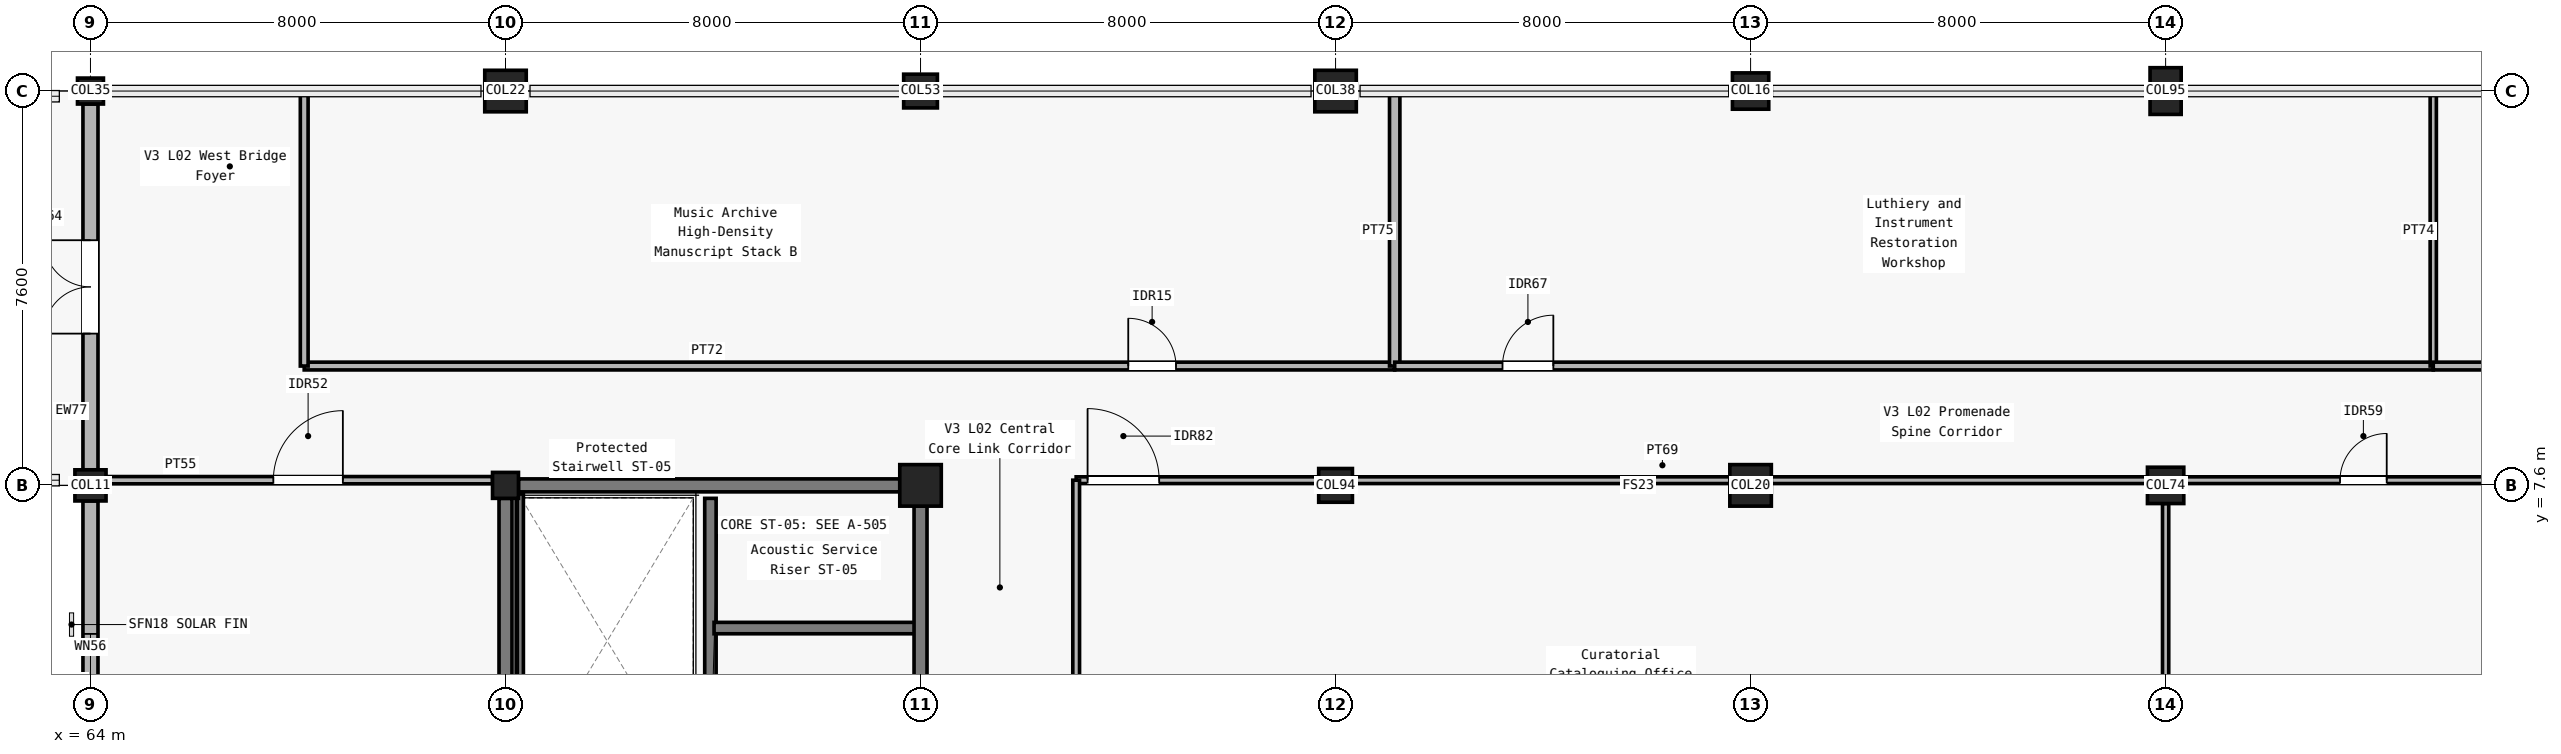
"""IFC4 building model, lengths in metres.
Left out: names, types, materials, properties, quantities, classifications, styles, units other than length and angle.
Written with IfcOpenShell. Run it as: python <this file> out.ifc"""

import sys

from ifc_helpers import new_model, si_unit, direction, frame, frame_2d, origin, origin_2d, place, context, subcontext, project, spatial, rectangle, circle, extrude, element, fill, save


model = new_model("IFC4")
c1 = context("Model", 3, precision=1e-05, world=origin(), true_north=direction((0.0, 1.0)))
c2 = subcontext(c1, "Body", "Model", "MODEL_VIEW")
j1 = project(units=[si_unit("LENGTHUNIT", "METRE"), si_unit("PLANEANGLEUNIT", "RADIAN")], contexts=[c1])
p1 = place(None, origin())
s1 = spatial("IfcSite", under=j1, at=p1, CompositionType="ELEMENT")
p2 = place(p1, origin())
s2 = spatial("IfcBuilding", under=s1, at=p2, CompositionType="ELEMENT")
p3 = place(p2, frame((0.0, 0.0, 10.2)))
s3 = spatial("IfcBuildingStorey", under=s2, at=p3, CompositionType="ELEMENT", Elevation=10.2)
p4 = place(p3, frame((64.0, 7.6, 0.0), z_axis=(0.0, 0.0, 1.0), x_axis=(1.0, 0.0, 0.0)))
e1 = element("IfcColumn", 1, at=p4, inside=s3, PredefinedType="COLUMN", context=c2, shape_type="SweptSolid", body=[
    extrude(rectangle(XDim=0.6, YDim=0.6, at=origin_2d()), origin(), (0.0, 0.0, 1.0), 4.8),
])
for number, where, z_axis, x_axis in (
    (2, (64.0, 15.2, 0.0), (0.0, 0.0, 1.0), (1.0, 0.0, 0.0)),
    (3, (72.0, 7.6, 0.0), (0.0, 0.0, 1.0), (1.0, 0.0, 0.0)),
):
    element("IfcColumn", number, at=place(p3, frame(where, z_axis=z_axis, x_axis=x_axis)), inside=s3, PredefinedType="COLUMN", context=c2, shape_type="SweptSolid", body=[
        extrude(rectangle(XDim=0.5, YDim=0.5, at=origin_2d()), origin(), (0.0, 0.0, 1.0), 4.8),
    ])
for number, where, z_axis, x_axis in (
    (4, (72.0, 15.2, 0.0), (0.0, 0.0, 1.0), (1.0, 0.0, 0.0)),
    (5, (80.0, 7.6, 0.0), (0.0, 0.0, 1.0), (1.0, 0.0, 0.0)),
):
    element("IfcColumn", number, at=place(p3, frame(where, z_axis=z_axis, x_axis=x_axis)), inside=s3, PredefinedType="COLUMN", context=c2, shape_type="SweptSolid", body=[
        extrude(circle(Radius=0.4, at=origin_2d()), origin(), (0.0, 0.0, 1.0), 4.8),
    ])
for number, where, z_axis, x_axis in (
    (6, (80.0, 15.2, 0.0), (0.0, 0.0, 1.0), (1.0, 0.0, 0.0)),
    (7, (88.0, 7.6, 0.0), (0.0, 0.0, 1.0), (1.0, 0.0, 0.0)),
):
    element("IfcColumn", number, at=place(p3, frame(where, z_axis=z_axis, x_axis=x_axis)), inside=s3, PredefinedType="COLUMN", context=c2, shape_type="SweptSolid", body=[
        extrude(circle(Radius=0.325, at=origin_2d()), origin(), (0.0, 0.0, 1.0), 4.8),
    ])
for number, where, z_axis, x_axis in (
    (8, (88.0, 15.2, 0.0), (0.0, 0.0, 1.0), (1.0, 0.0, 0.0)),
    (9, (96.0, 7.6, 0.0), (0.0, 0.0, 1.0), (1.0, 0.0, 0.0)),
):
    element("IfcColumn", number, at=place(p3, frame(where, z_axis=z_axis, x_axis=x_axis)), inside=s3, PredefinedType="COLUMN", context=c2, shape_type="SweptSolid", body=[
        extrude(rectangle(XDim=0.8, YDim=0.8, at=origin_2d()), origin(), (0.0, 0.0, 1.0), 4.8),
    ])
for number, where, z_axis, x_axis in (
    (10, (96.0, 15.2, 0.0), (0.0, 0.0, 1.0), (1.0, 0.0, 0.0)),
    (11, (104.0, 7.6, 0.0), (0.0, 0.0, 1.0), (1.0, 0.0, 0.0)),
):
    element("IfcColumn", number, at=place(p3, frame(where, z_axis=z_axis, x_axis=x_axis)), inside=s3, PredefinedType="COLUMN", context=c2, shape_type="SweptSolid", body=[
        extrude(rectangle(XDim=0.7, YDim=0.7, at=origin_2d()), origin(), (0.0, 0.0, 1.0), 4.8),
    ])
p5 = place(p3, frame((104.0, 15.2, 0.0), z_axis=(0.0, 0.0, 1.0), x_axis=(1.0, 0.0, 0.0)))
e12 = element("IfcColumn", 12, at=p5, inside=s3, PredefinedType="COLUMN", context=c2, shape_type="SweptSolid", body=[
    extrude(rectangle(XDim=0.6, YDim=0.9, at=origin_2d()), origin(), (0.0, 0.0, 1.0), 4.8),
])
p6 = place(p3, frame((64.0, 0.375, 0.0), z_axis=(0.0, 0.0, 1.0), x_axis=(0.0, 1.0, 0.0)))
e13 = element("IfcWall", 13, at=p6, inside=s3, PredefinedType="SOLIDWALL", context=c2, shape_type="SweptSolid", body=[
    extrude(rectangle(XDim=6.925, YDim=0.29, at=frame_2d((3.462, 0.0))), origin(), (0.0, 0.0, 1.0), 4.13),
])
p7 = place(p6, frame((2.562, 0.0, 0.95)))
e14 = element("IfcOpeningElement", 14, at=p7, cuts=e13, PredefinedType="OPENING", context=c2, shape_type="SweptSolid", body=[
    extrude(rectangle(XDim=1.8, YDim=1.5, at=frame_2d((0.9, 0.75))), frame((0.0, 0.155, 0.0), z_axis=(0.0, -1.0, 0.0), x_axis=(1.0, 0.0, 0.0)), (0.0, 0.0, 1.0), 0.31),
])
p8 = place(p3, frame((64.0, 7.9, 0.0), z_axis=(0.0, 0.0, 1.0), x_axis=(0.0, 1.0, 0.0)))
e15 = element("IfcWall", 15, at=p8, inside=s3, PredefinedType="SOLIDWALL", context=c2, shape_type="SweptSolid", body=[
    extrude(rectangle(XDim=7.05, YDim=0.29, at=frame_2d((3.525, 0.0))), origin(), (0.0, 0.0, 1.0), 4.13),
])
p9 = place(p8, frame((2.625, 0.0, 0.0)))
e16 = element("IfcOpeningElement", 16, at=p9, cuts=e15, PredefinedType="OPENING", context=c2, shape_type="SweptSolid", body=[
    extrude(rectangle(XDim=1.8, YDim=2.25, at=frame_2d((0.9, 1.125))), frame((0.0, 0.155, 0.0), z_axis=(0.0, -1.0, 0.0), x_axis=(1.0, 0.0, 0.0)), (0.0, 0.0, 1.0), 0.31),
])
p10 = place(p3, frame((72.0, 0.3, 0.0), z_axis=(0.0, 0.0, 1.0), x_axis=(0.0, 1.0, 0.0)))
e17 = element("IfcWall", 17, at=p10, inside=s3, PredefinedType="SOLIDWALL", context=c2, shape_type="SweptSolid", body=[
    extrude(rectangle(XDim=7.05, YDim=0.25, at=frame_2d((3.525, 0.0))), origin(), (0.0, 0.0, 1.0), 2.71),
])
p11 = place(p3, frame((72.25, 7.6, 0.0), z_axis=(0.0, 0.0, 1.0), x_axis=(1.0, 0.0, 0.0)))
e18 = element("IfcWall", 18, at=p11, inside=s3, PredefinedType="SOLIDWALL", context=c2, shape_type="SweptSolid", body=[
    extrude(rectangle(XDim=7.35, YDim=0.25, at=frame_2d((3.675, 0.0))), origin(), (0.0, 0.0, 1.0), 2.71),
])
p12 = place(p3, frame((75.95, 0.25, 0.0), z_axis=(0.0, 0.0, 1.0), x_axis=(0.0, 1.0, 0.0)))
e19 = element("IfcWall", 19, at=p12, inside=s3, PredefinedType="SOLIDWALL", context=c2, shape_type="SweptSolid", body=[
    extrude(rectangle(XDim=7.1, YDim=0.22, at=frame_2d((3.55, 0.0))), origin(), (0.0, 0.0, 1.0), 4.52),
])
p13 = place(p12, frame((0.35, 0.0, 0.0)))
e20 = element("IfcOpeningElement", 20, at=p13, cuts=e19, PredefinedType="OPENING", context=c2, shape_type="SweptSolid", body=[
    extrude(rectangle(XDim=1.2, YDim=2.15, at=frame_2d((0.6, 1.075))), frame((0.0, 0.12, 0.0), z_axis=(0.0, -1.0, 0.0), x_axis=(1.0, 0.0, 0.0)), (0.0, 0.0, 1.0), 0.24),
])
p14 = place(p3, frame((76.02, 4.85, 0.0), z_axis=(0.0, 0.0, 1.0), x_axis=(1.0, 0.0, 0.0)))
e21 = element("IfcWall", 21, at=p14, inside=s3, PredefinedType="SOLIDWALL", context=c2, shape_type="SweptSolid", body=[
    extrude(rectangle(XDim=3.93, YDim=0.22, at=frame_2d((1.965, 0.0))), origin(), (0.0, 0.0, 1.0), 3.89),
])
p15 = place(p3, frame((80.0, 0.25, 0.0), z_axis=(0.0, 0.0, 1.0), x_axis=(0.0, 1.0, 0.0)))
e22 = element("IfcWall", 22, at=p15, inside=s3, PredefinedType="SOLIDWALL", context=c2, shape_type="SweptSolid", body=[
    extrude(rectangle(XDim=6.95, YDim=0.25, at=frame_2d((3.475, 0.0))), origin(), (0.0, 0.0, 1.0), 3.89),
])
p16 = place(p15, frame((2.1, 0.0, 0.0)))
e23 = element("IfcOpeningElement", 23, at=p16, cuts=e22, PredefinedType="OPENING", context=c2, shape_type="SweptSolid", body=[
    extrude(rectangle(XDim=1.35, YDim=2.2, at=frame_2d((0.675, 1.1))), frame((0.0, 0.135, 0.0), z_axis=(0.0, -1.0, 0.0), x_axis=(1.0, 0.0, 0.0)), (0.0, 0.0, 1.0), 0.27),
])
p17 = place(p3, frame((68.12, 9.9, 0.0), z_axis=(0.0, 0.0, 1.0), x_axis=(1.0, 0.0, 0.0)))
e24 = element("IfcWall", 24, at=p17, inside=s3, PredefinedType="PARTITIONING", context=c2, shape_type="SweptSolid", body=[
    extrude(rectangle(XDim=21.02, YDim=0.15, at=frame_2d((10.51, 0.0))), origin(), (0.0, 0.0, 1.0), 3.89),
])
p18 = place(p17, frame((15.884, 0.0, 0.0)))
e25 = element("IfcOpeningElement", 25, at=p18, cuts=e24, PredefinedType="OPENING", context=c2, shape_type="SweptSolid", body=[
    extrude(rectangle(XDim=0.92, YDim=2.15, at=frame_2d((0.46, 1.075))), frame((0.0, 0.085, 0.0), z_axis=(0.0, -1.0, 0.0), x_axis=(1.0, 0.0, 0.0)), (0.0, 0.0, 1.0), 0.17),
])
p19 = place(p3, frame((89.14, 9.9, 0.0), z_axis=(0.0, 0.0, 1.0), x_axis=(0.0, 1.0, 0.0)))
e26 = element("IfcWall", 26, at=p19, inside=s3, PredefinedType="PARTITIONING", context=c2, shape_type="SweptSolid", body=[
    extrude(rectangle(XDim=5.22, YDim=0.2, at=frame_2d((2.61, 0.0))), origin(), (0.0, 0.0, 1.0), 3.955),
])
p20 = place(p3, frame((89.14, 9.9, 0.0), z_axis=(0.0, 0.0, 1.0), x_axis=(1.0, 0.0, 0.0)))
e27 = element("IfcWall", 27, at=p20, inside=s3, PredefinedType="PARTITIONING", context=c2, shape_type="SweptSolid", body=[
    extrude(rectangle(XDim=20.019, YDim=0.15, at=frame_2d((10.01, 0.0))), origin(), (0.0, 0.0, 1.0), 3.745),
])
p21 = place(p20, frame((2.078, 0.0, 0.0)))
e28 = element("IfcOpeningElement", 28, at=p21, cuts=e27, PredefinedType="OPENING", context=c2, shape_type="SweptSolid", body=[
    extrude(rectangle(XDim=0.98, YDim=2.15, at=frame_2d((0.49, 1.075))), frame((0.0, 0.085, 0.0), z_axis=(0.0, -1.0, 0.0), x_axis=(1.0, 0.0, 0.0)), (0.0, 0.0, 1.0), 0.17),
])
p22 = place(p3, frame((109.159, 9.9, 0.0), z_axis=(0.0, 0.0, 1.0), x_axis=(0.0, 1.0, 0.0)))
e29 = element("IfcWall", 29, at=p22, inside=s3, PredefinedType="PARTITIONING", context=c2, shape_type="SweptSolid", body=[
    extrude(rectangle(XDim=5.22, YDim=0.12, at=frame_2d((2.61, 0.0))), origin(), (0.0, 0.0, 1.0), 3.745),
])
p23 = place(p3, frame((109.159, 9.9, 0.0), z_axis=(0.0, 0.0, 1.0), x_axis=(1.0, 0.0, 0.0)))
e30 = element("IfcWall", 30, at=p23, inside=s3, PredefinedType="PARTITIONING", context=c2, shape_type="SweptSolid", body=[
    extrude(rectangle(XDim=16.015, YDim=0.15, at=frame_2d((8.008, 0.0))), origin(), (0.0, 0.0, 1.0), 3.82),
])
p24 = place(p23, frame((6.05, 0.0, 0.0)))
e31 = element("IfcOpeningElement", 31, at=p24, cuts=e30, PredefinedType="OPENING", context=c2, shape_type="SweptSolid", body=[
    extrude(rectangle(XDim=1.04, YDim=2.15, at=frame_2d((0.52, 1.075))), frame((0.0, 0.085, 0.0), z_axis=(0.0, -1.0, 0.0), x_axis=(1.0, 0.0, 0.0)), (0.0, 0.0, 1.0), 0.17),
])
p25 = place(p3, frame((68.12, 9.9, 0.0), z_axis=(0.0, 0.0, 1.0), x_axis=(0.0, 1.0, 0.0)))
e32 = element("IfcWall", 32, at=p25, inside=s3, PredefinedType="PARTITIONING", context=c2, shape_type="SweptSolid", body=[
    extrude(rectangle(XDim=5.22, YDim=0.15, at=frame_2d((2.61, 0.0))), origin(), (0.0, 0.0, 1.0), 2.71),
])
p26 = place(p3, frame((64.3, 7.7, 0.0), z_axis=(0.0, 0.0, 1.0), x_axis=(1.0, 0.0, 0.0)))
e33 = element("IfcWall", 33, at=p26, inside=s3, PredefinedType="PARTITIONING", context=c2, shape_type="SweptSolid", body=[
    extrude(rectangle(XDim=7.45, YDim=0.14, at=frame_2d((3.725, 0.0))), origin(), (0.0, 0.0, 1.0), 2.71),
])
p27 = place(p26, frame((3.225, 0.0, 0.0)))
e34 = element("IfcOpeningElement", 34, at=p27, cuts=e33, PredefinedType="OPENING", context=c2, shape_type="SweptSolid", body=[
    extrude(rectangle(XDim=1.34, YDim=2.2, at=frame_2d((0.67, 1.1))), frame((0.0, 0.08, 0.0), z_axis=(0.0, -1.0, 0.0), x_axis=(1.0, 0.0, 0.0)), (0.0, 0.0, 1.0), 0.16),
])
p28 = place(p3, frame((83.0, 7.7, 0.0), z_axis=(0.0, 0.0, 1.0), x_axis=(1.0, 0.0, 0.0)))
e35 = element("IfcWall", 35, at=p28, inside=s3, PredefinedType="PARTITIONING", context=c2, shape_type="SweptSolid", body=[
    extrude(rectangle(XDim=20.65, YDim=0.13, at=frame_2d((10.325, 0.0))), origin(), (0.0, 0.0, 1.0), 3.745),
])
p29 = place(p28, frame((0.22, 0.0, 0.0)))
e36 = element("IfcOpeningElement", 36, at=p29, cuts=e35, PredefinedType="OPENING", context=c2, shape_type="SweptSolid", body=[
    extrude(rectangle(XDim=1.38, YDim=2.2, at=frame_2d((0.69, 1.1))), frame((0.0, 0.075, 0.0), z_axis=(0.0, -1.0, 0.0), x_axis=(1.0, 0.0, 0.0)), (0.0, 0.0, 1.0), 0.15),
])
p30 = place(p3, frame((104.0, 0.4, 0.0), z_axis=(0.0, 0.0, 1.0), x_axis=(0.0, 1.0, 0.0)))
e37 = element("IfcWall", 37, at=p30, inside=s3, PredefinedType="PARTITIONING", context=c2, shape_type="SweptSolid", body=[
    extrude(rectangle(XDim=6.85, YDim=0.12, at=frame_2d((3.425, 0.0))), origin(), (0.0, 0.0, 1.0), 3.77),
])
p31 = place(p3, frame((104.35, 7.7, 0.0), z_axis=(0.0, 0.0, 1.0), x_axis=(1.0, 0.0, 0.0)))
e38 = element("IfcWall", 38, at=p31, inside=s3, PredefinedType="PARTITIONING", context=c2, shape_type="SweptSolid", body=[
    extrude(rectangle(XDim=15.4, YDim=0.13, at=frame_2d((7.7, 0.0))), origin(), (0.0, 0.0, 1.0), 3.66),
])
p32 = place(p31, frame((3.012, 0.0, 0.0)))
e39 = element("IfcOpeningElement", 39, at=p32, cuts=e38, PredefinedType="OPENING", context=c2, shape_type="SweptSolid", body=[
    extrude(rectangle(XDim=0.9, YDim=2.05, at=frame_2d((0.45, 1.025))), frame((0.0, 0.075, 0.0), z_axis=(0.0, -1.0, 0.0), x_axis=(1.0, 0.0, 0.0)), (0.0, 0.0, 1.0), 0.15),
])
p33 = place(p3, frame((83.0, 0.08, 0.0), z_axis=(0.0, 0.0, 1.0), x_axis=(0.0, 1.0, 0.0)))
e40 = element("IfcWall", 40, at=p33, inside=s3, PredefinedType="PARTITIONING", context=c2, shape_type="SweptSolid", body=[
    extrude(rectangle(XDim=7.62, YDim=0.13, at=frame_2d((3.81, 0.0))), origin(), (0.0, 0.0, 1.0), 3.89),
])
p34 = place(p3, frame((72.275, 0.15, 0.0), z_axis=(0.0, 0.0, 1.0), x_axis=(0.0, 1.0, 0.0)))
e41 = element("IfcWall", 41, at=p34, inside=s3, PredefinedType="SOLIDWALL", context=c2, shape_type="SweptSolid", body=[
    extrude(rectangle(XDim=7.3, YDim=0.14, at=frame_2d((3.65, 0.0))), origin(), (0.0, 0.0, 1.0), 4.52),
])
p35 = place(p7, origin())
e42 = element("IfcWindow", 42, at=p35, inside=s3, PartitioningType="DOUBLE_PANEL_VERTICAL", PredefinedType="WINDOW", context=c2, shape_type="SweptSolid", body=[
    extrude(rectangle(XDim=1.8, YDim=1.5, at=frame_2d((0.9, 0.75))), frame((0.0, 0.03, 0.0), z_axis=(0.0, -1.0, 0.0), x_axis=(1.0, 0.0, 0.0)), (0.0, 0.0, 1.0), 0.06),
])
fill(e14, e42)
p36 = place(p9, origin())
e43 = element("IfcDoor", 43, at=p36, inside=s3, OperationType="DOUBLE_DOOR_SINGLE_SWING", PredefinedType="DOOR", context=c2, shape_type="SweptSolid", body=[
    extrude(rectangle(XDim=1.8, YDim=2.25, at=frame_2d((0.9, 1.125))), frame((0.0, 0.025, 0.0), z_axis=(0.0, -1.0, 0.0), x_axis=(1.0, 0.0, 0.0)), (0.0, 0.0, 1.0), 0.05),
])
fill(e16, e43)
p37 = place(p18, origin())
e44 = element("IfcDoor", 44, at=p37, inside=s3, OperationType="SINGLE_SWING_LEFT", PredefinedType="DOOR", context=c2, shape_type="SweptSolid", body=[
    extrude(rectangle(XDim=0.92, YDim=2.15, at=frame_2d((0.46, 1.075))), frame((0.0, 0.025, 0.0), z_axis=(0.0, -1.0, 0.0), x_axis=(1.0, 0.0, 0.0)), (0.0, 0.0, 1.0), 0.05),
])
fill(e25, e44)
p38 = place(p21, origin())
e45 = element("IfcDoor", 45, at=p38, inside=s3, OperationType="SINGLE_SWING_RIGHT", PredefinedType="DOOR", context=c2, shape_type="SweptSolid", body=[
    extrude(rectangle(XDim=0.98, YDim=2.15, at=frame_2d((0.49, 1.075))), frame((0.0, 0.025, 0.0), z_axis=(0.0, -1.0, 0.0), x_axis=(1.0, 0.0, 0.0)), (0.0, 0.0, 1.0), 0.05),
])
fill(e28, e45)
p39 = place(p27, origin())
e46 = element("IfcDoor", 46, at=p39, inside=s3, OperationType="SINGLE_SWING_RIGHT", PredefinedType="DOOR", context=c2, shape_type="SweptSolid", body=[
    extrude(rectangle(XDim=1.34, YDim=2.2, at=frame_2d((0.67, 1.1))), frame((0.0, 0.025, 0.0), z_axis=(0.0, -1.0, 0.0), x_axis=(1.0, 0.0, 0.0)), (0.0, 0.0, 1.0), 0.05),
])
fill(e34, e46)
p40 = place(p29, origin())
e47 = element("IfcDoor", 47, at=p40, inside=s3, OperationType="SINGLE_SWING_LEFT", PredefinedType="DOOR", context=c2, shape_type="SweptSolid", body=[
    extrude(rectangle(XDim=1.38, YDim=2.2, at=frame_2d((0.69, 1.1))), frame((0.0, 0.025, 0.0), z_axis=(0.0, -1.0, 0.0), x_axis=(1.0, 0.0, 0.0)), (0.0, 0.0, 1.0), 0.05),
])
fill(e36, e47)
p41 = place(p32, origin())
e48 = element("IfcDoor", 48, at=p41, inside=s3, OperationType="SINGLE_SWING_RIGHT", PredefinedType="DOOR", context=c2, shape_type="SweptSolid", body=[
    extrude(rectangle(XDim=0.9, YDim=2.05, at=frame_2d((0.45, 1.025))), frame((0.0, 0.025, 0.0), z_axis=(0.0, -1.0, 0.0), x_axis=(1.0, 0.0, 0.0)), (0.0, 0.0, 1.0), 0.05),
])
fill(e39, e48)
save(model, sys.argv[1])
